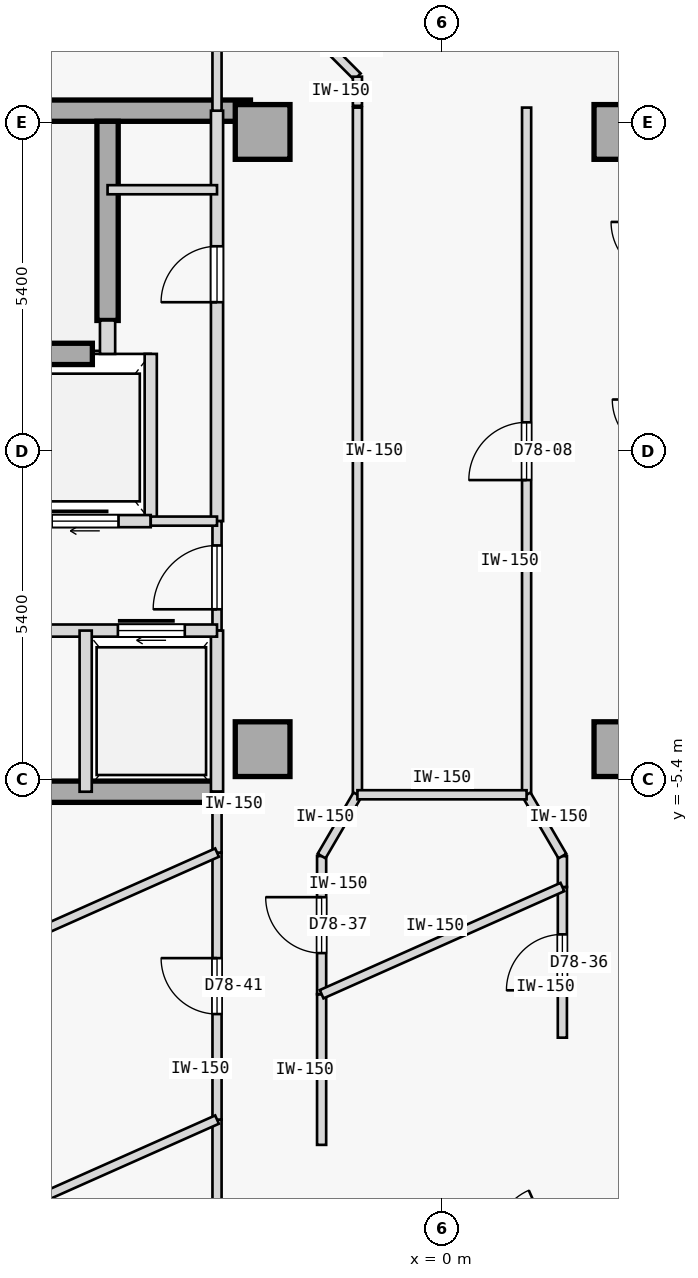
"""IFC4 building model, lengths in metres.
Left out: names, types, materials, properties, quantities, classifications, styles, units other than length and angle.
Written with IfcOpenShell. Run it as: python <this file> out.ifc"""

import sys

from ifc_helpers import new_model, si_unit, direction, frame, frame_2d, origin, origin_2d, place, context, subcontext, project, spatial, rectangle, extrude, element, fill, save


model = new_model("IFC4")
c1 = context("Model", 3, precision=1e-05, world=origin(), true_north=direction((0.0, 1.0)))
c2 = subcontext(c1, "Body", "Model", "MODEL_VIEW")
j1 = project(units=[si_unit("LENGTHUNIT", "METRE"), si_unit("PLANEANGLEUNIT", "RADIAN")], contexts=[c1])
p1 = place(None, origin())
s1 = spatial("IfcSite", under=j1, at=p1, CompositionType="ELEMENT")
p2 = place(p1, origin())
s2 = spatial("IfcBuilding", under=s1, at=p2, CompositionType="ELEMENT")
p3 = place(p2, frame((0.0, 0.0, 291.95)))
s3 = spatial("IfcBuildingStorey", under=s2, at=p3, CompositionType="ELEMENT", Elevation=291.95)
for number, where, z_axis, x_axis in (
    (1, (-2.95, -4.9, 0.0), (0.0, 0.0, 1.0), (1.0, 0.0, 0.0)),
    (2, (-2.95, 5.25, 0.0), (0.0, 0.0, 1.0), (1.0, 0.0, 0.0)),
    (3, (2.95, -4.9, 0.0), (0.0, 0.0, 1.0), (1.0, 0.0, 0.0)),
    (4, (2.95, 5.25, 0.0), (0.0, 0.0, 1.0), (1.0, 0.0, 0.0)),
):
    element("IfcColumn", number, at=place(p3, frame(where, z_axis=z_axis, x_axis=x_axis)), inside=s3, PredefinedType="COLUMN", context=c2, shape_type="SweptSolid", body=[
        extrude(rectangle(XDim=0.9, YDim=0.9, at=origin_2d()), origin(), (0.0, 0.0, 1.0), 3.35),
    ])
p4 = place(p3, frame((-14.56, 5.6, 0.0), z_axis=(0.0, 0.0, 1.0), x_axis=(1.0, 0.0, 0.0)))
e5 = element("IfcWall", 5, at=p4, inside=s3, PredefinedType="SHEAR", context=c2, shape_type="SweptSolid", body=[
    extrude(rectangle(XDim=11.41, YDim=0.35, at=frame_2d((5.705, 0.0))), origin(), (0.0, 0.0, 1.0), 3.125),
])
p5 = place(p3, frame((-14.56, -5.6, 0.0), z_axis=(0.0, 0.0, 1.0), x_axis=(1.0, 0.0, 0.0)))
e6 = element("IfcWall", 6, at=p5, inside=s3, PredefinedType="SHEAR", context=c2, shape_type="SweptSolid", body=[
    extrude(rectangle(XDim=10.86, YDim=0.35, at=frame_2d((5.43, 0.0))), origin(), (0.0, 0.0, 1.0), 3.125),
])
p6 = place(p3, frame((-5.5, 2.15, 0.0), z_axis=(0.0, 0.0, 1.0), x_axis=(0.0, 1.0, 0.0)))
e7 = element("IfcWall", 7, at=p6, inside=s3, PredefinedType="SHEAR", context=c2, shape_type="SweptSolid", body=[
    extrude(rectangle(XDim=3.275, YDim=0.35, at=frame_2d((1.638, 0.0))), origin(), (0.0, 0.0, 1.0), 3.125),
])
p7 = place(p3, frame((-10.9, 1.6, 0.0), z_axis=(0.0, 0.0, 1.0), x_axis=(1.0, 0.0, 0.0)))
e8 = element("IfcWall", 8, at=p7, inside=s3, PredefinedType="SHEAR", context=c2, shape_type="SweptSolid", body=[
    extrude(rectangle(XDim=5.15, YDim=0.35, at=frame_2d((2.575, 0.0))), origin(), (0.0, 0.0, 1.0), 3.125),
])
p8 = place(p3, frame((-5.5, 1.6, 0.0), z_axis=(0.0, 0.0, 1.0), x_axis=(0.0, 1.0, 0.0)))
e9 = element("IfcWall", 9, at=p8, inside=s3, PredefinedType="STANDARD", context=c2, shape_type="SweptSolid", body=[
    extrude(rectangle(XDim=0.55, YDim=0.25, at=frame_2d((0.275, 0.0))), origin(), (0.0, 0.0, 1.0), 3.125),
])
p9 = place(p3, frame((-3.7, -1.15, 0.0), z_axis=(0.0, 0.0, 1.0), x_axis=(0.0, 1.0, 0.0)))
e10 = element("IfcWall", 10, at=p9, inside=s3, PredefinedType="STANDARD", context=c2, shape_type="SweptSolid", body=[
    extrude(rectangle(XDim=6.75, YDim=0.2, at=frame_2d((3.375, 0.0))), origin(), (0.0, 0.0, 1.0), 3.125),
])
p10 = place(p9, frame((3.6, 0.0, 0.0)))
e11 = element("IfcOpeningElement", 11, at=p10, cuts=e10, PredefinedType="OPENING", context=c2, shape_type="SweptSolid", body=[
    extrude(rectangle(XDim=0.92, YDim=2.15, at=frame_2d((0.46, 1.075))), frame((0.0, 0.11, 0.0), z_axis=(0.0, -1.0, 0.0), x_axis=(1.0, 0.0, 0.0)), (0.0, 0.0, 1.0), 0.22),
])
p11 = place(p3, frame((-3.7, -2.95, 0.0), z_axis=(0.0, 0.0, 1.0), x_axis=(0.0, 1.0, 0.0)))
e12 = element("IfcWall", 12, at=p11, inside=s3, PredefinedType="PARTITIONING", context=c2, shape_type="SweptSolid", body=[
    extrude(rectangle(XDim=1.8, YDim=0.15, at=frame_2d((0.9, 0.0))), origin(), (0.0, 0.0, 1.0), 3.125),
])
p12 = place(p11, frame((0.35, 0.0, 0.0)))
e13 = element("IfcOpeningElement", 13, at=p12, cuts=e12, PredefinedType="OPENING", context=c2, shape_type="SweptSolid", body=[
    extrude(rectangle(XDim=1.05, YDim=2.18, at=frame_2d((0.525, 1.09))), frame((0.0, 0.085, 0.0), z_axis=(0.0, -1.0, 0.0), x_axis=(1.0, 0.0, 0.0)), (0.0, 0.0, 1.0), 0.17),
])
p13 = place(p3, frame((-3.7, -5.6, 0.0), z_axis=(0.0, 0.0, 1.0), x_axis=(0.0, 1.0, 0.0)))
e14 = element("IfcWall", 14, at=p13, inside=s3, PredefinedType="STANDARD", context=c2, shape_type="SweptSolid", body=[
    extrude(rectangle(XDim=2.65, YDim=0.2, at=frame_2d((1.325, 0.0))), origin(), (0.0, 0.0, 1.0), 3.125),
])
p14 = place(p3, frame((-4.79, -1.15, 0.0), z_axis=(0.0, 0.0, 1.0), x_axis=(0.0, 1.0, 0.0)))
e15 = element("IfcWall", 15, at=p14, inside=s3, PredefinedType="STANDARD", context=c2, shape_type="SweptSolid", body=[
    extrude(rectangle(XDim=2.75, YDim=0.2, at=frame_2d((1.375, 0.0))), origin(), (0.0, 0.0, 1.0), 3.125),
])
p15 = place(p3, frame((-6.95, -1.15, 0.0), z_axis=(0.0, 0.0, 1.0), x_axis=(1.0, 0.0, 0.0)))
e16 = element("IfcWall", 16, at=p15, inside=s3, PredefinedType="STANDARD", context=c2, shape_type="SweptSolid", body=[
    extrude(rectangle(XDim=2.16, YDim=0.2, at=frame_2d((1.08, 0.0))), origin(), (0.0, 0.0, 1.0), 3.125),
])
p16 = place(p15, frame((0.53, 0.0, 0.0)))
e17 = element("IfcOpeningElement", 17, at=p16, cuts=e16, PredefinedType="OPENING", context=c2, shape_type="SweptSolid", body=[
    extrude(rectangle(XDim=1.1, YDim=2.15, at=frame_2d((0.55, 1.075))), frame((0.0, 0.11, 0.0), z_axis=(0.0, -1.0, 0.0), x_axis=(1.0, 0.0, 0.0)), (0.0, 0.0, 1.0), 0.22),
])
p17 = place(p3, frame((-4.79, -1.15, 0.0), z_axis=(0.0, 0.0, 1.0), x_axis=(1.0, 0.0, 0.0)))
e18 = element("IfcWall", 18, at=p17, inside=s3, PredefinedType="PARTITIONING", context=c2, shape_type="SweptSolid", body=[
    extrude(rectangle(XDim=1.09, YDim=0.15, at=frame_2d((0.545, 0.0))), origin(), (0.0, 0.0, 1.0), 3.125),
])
p18 = place(p3, frame((-14.5, -2.95, 0.0), z_axis=(0.0, 0.0, 1.0), x_axis=(1.0, 0.0, 0.0)))
e19 = element("IfcWall", 19, at=p18, inside=s3, PredefinedType="STANDARD", context=c2, shape_type="SweptSolid", body=[
    extrude(rectangle(XDim=10.8, YDim=0.2, at=frame_2d((5.4, 0.0))), origin(), (0.0, 0.0, 1.0), 3.125),
])
p19 = place(p18, frame((9.17, 0.0, 0.0)))
e20 = element("IfcOpeningElement", 20, at=p19, cuts=e19, PredefinedType="OPENING", context=c2, shape_type="SweptSolid", body=[
    extrude(rectangle(XDim=1.1, YDim=2.15, at=frame_2d((0.55, 1.075))), frame((0.0, 0.11, 0.0), z_axis=(0.0, -1.0, 0.0), x_axis=(1.0, 0.0, 0.0)), (0.0, 0.0, 1.0), 0.22),
])
p20 = place(p18, frame((2.13, 0.0, 0.0)))
e21 = element("IfcOpeningElement", 21, at=p20, cuts=e19, PredefinedType="OPENING", context=c2, shape_type="SweptSolid", body=[
    extrude(rectangle(XDim=0.92, YDim=2.15, at=frame_2d((0.46, 1.075))), frame((0.0, 0.11, 0.0), z_axis=(0.0, -1.0, 0.0), x_axis=(1.0, 0.0, 0.0)), (0.0, 0.0, 1.0), 0.22),
])
p21 = place(p18, frame((6.45, 0.0, 0.0)))
e22 = element("IfcOpeningElement", 22, at=p21, cuts=e19, PredefinedType="OPENING", context=c2, shape_type="SweptSolid", body=[
    extrude(rectangle(XDim=0.92, YDim=2.15, at=frame_2d((0.46, 1.075))), frame((0.0, 0.11, 0.0), z_axis=(0.0, -1.0, 0.0), x_axis=(1.0, 0.0, 0.0)), (0.0, 0.0, 1.0), 0.22),
])
p22 = place(p3, frame((-5.86, -5.6, 0.0), z_axis=(0.0, 0.0, 1.0), x_axis=(0.0, 1.0, 0.0)))
e23 = element("IfcWall", 23, at=p22, inside=s3, PredefinedType="STANDARD", context=c2, shape_type="SweptSolid", body=[
    extrude(rectangle(XDim=2.65, YDim=0.2, at=frame_2d((1.325, 0.0))), origin(), (0.0, 0.0, 1.0), 3.125),
])
p23 = place(p3, frame((-5.5, 4.3, 0.0), z_axis=(0.0, 0.0, 1.0), x_axis=(1.0, 0.0, 0.0)))
e24 = element("IfcWall", 24, at=p23, inside=s3, PredefinedType="PARTITIONING", context=c2, shape_type="SweptSolid", body=[
    extrude(rectangle(XDim=1.8, YDim=0.15, at=frame_2d((0.9, 0.0))), origin(), (0.0, 0.0, 1.0), 3.125),
])
p24 = place(p3, frame((-1.391, -5.65, 0.0), z_axis=(0.0, 0.0, 1.0), x_axis=(-2.1605738e-05, 0.999999999767, 0.0)))
e25 = element("IfcWall", 25, at=p24, inside=s3, PredefinedType="PARTITIONING", context=c2, shape_type="SweptSolid", body=[
    extrude(rectangle(XDim=11.3, YDim=0.15, at=frame_2d((5.65, 0.0))), origin(), (0.0, 0.0, 1.0), 3.125),
])
p25 = place(p3, frame((1.391, -5.65, 0.0), z_axis=(0.0, 0.0, 1.0), x_axis=(4.3206809e-05, 0.999999999067, 0.0)))
e26 = element("IfcWall", 26, at=p25, inside=s3, PredefinedType="PARTITIONING", context=c2, shape_type="SweptSolid", body=[
    extrude(rectangle(XDim=11.301, YDim=0.15, at=frame_2d((5.65, 0.0))), origin(), (0.0, 0.0, 1.0), 3.125),
])
p26 = place(p25, frame((5.176, 0.0, 0.0)))
e27 = element("IfcOpeningElement", 27, at=p26, cuts=e26, PredefinedType="OPENING", context=c2, shape_type="SweptSolid", body=[
    extrude(rectangle(XDim=0.95, YDim=2.15, at=frame_2d((0.475, 1.075))), frame((0.0, 0.085, 0.0), z_axis=(0.0, -1.0, 0.0), x_axis=(1.0, 0.0, 0.0)), (0.0, 0.0, 1.0), 0.17),
])
p27 = place(p3, frame((-4.445, -15.808, 0.0), z_axis=(0.0, 0.0, 1.0), x_axis=(0.913546853922, 0.406733506966, 0.0)))
e28 = element("IfcWall", 28, at=p27, inside=s3, PredefinedType="PARTITIONING", context=c2, shape_type="SweptSolid", body=[
    extrude(rectangle(XDim=12.751, YDim=0.15, at=frame_2d((6.375, 0.0))), origin(), (0.0, 0.0, 1.0), 3.125),
])
p28 = place(p27, frame((5.9, 0.0, 0.0)))
e29 = element("IfcOpeningElement", 29, at=p28, cuts=e28, PredefinedType="OPENING", context=c2, shape_type="SweptSolid", body=[
    extrude(rectangle(XDim=0.95, YDim=2.15, at=frame_2d((0.475, 1.075))), frame((0.0, 0.085, 0.0), z_axis=(0.0, -1.0, 0.0), x_axis=(1.0, 0.0, 0.0)), (0.0, 0.0, 1.0), 0.17),
])
p29 = place(p3, frame((-1.98, -11.407, 0.0), z_axis=(0.0, 0.0, 1.0), x_axis=(9.8551295e-05, 0.999999995144, 0.0)))
e30 = element("IfcWall", 30, at=p29, inside=s3, PredefinedType="PARTITIONING", context=c2, shape_type="SweptSolid", body=[
    extrude(rectangle(XDim=2.477, YDim=0.15, at=frame_2d((1.239, 0.0))), origin(), (0.0, 0.0, 1.0), 3.125),
])
p30 = place(p3, frame((1.979, -9.645, 0.0), z_axis=(0.0, 0.0, 1.0), x_axis=(9.8541584e-05, 0.999999995145, 0.0)))
e31 = element("IfcWall", 31, at=p30, inside=s3, PredefinedType="PARTITIONING", context=c2, shape_type="SweptSolid", body=[
    extrude(rectangle(XDim=2.478, YDim=0.15, at=frame_2d((1.239, 0.0))), origin(), (0.0, 0.0, 1.0), 3.125),
])
p31 = place(p30, frame((0.779, 0.0, 0.0)))
e32 = element("IfcOpeningElement", 32, at=p31, cuts=e31, PredefinedType="OPENING", context=c2, shape_type="SweptSolid", body=[
    extrude(rectangle(XDim=0.92, YDim=2.15, at=frame_2d((0.46, 1.075))), frame((0.0, 0.085, 0.0), z_axis=(0.0, -1.0, 0.0), x_axis=(1.0, 0.0, 0.0)), (0.0, 0.0, 1.0), 0.17),
])
p32 = place(p3, frame((-1.98, -8.93, 0.0), z_axis=(0.0, 0.0, 1.0), x_axis=(-0.000107446008, 0.999999994228, 0.0)))
e33 = element("IfcWall", 33, at=p32, inside=s3, PredefinedType="PARTITIONING", context=c2, shape_type="SweptSolid", body=[
    extrude(rectangle(XDim=2.272, YDim=0.15, at=frame_2d((1.136, 0.0))), origin(), (0.0, 0.0, 1.0), 3.125),
])
p33 = place(p32, frame((0.676, 0.0, 0.0)))
e34 = element("IfcOpeningElement", 34, at=p33, cuts=e33, PredefinedType="OPENING", context=c2, shape_type="SweptSolid", body=[
    extrude(rectangle(XDim=0.92, YDim=2.15, at=frame_2d((0.46, 1.075))), frame((0.0, 0.085, 0.0), z_axis=(0.0, -1.0, 0.0), x_axis=(1.0, 0.0, 0.0)), (0.0, 0.0, 1.0), 0.17),
])
p34 = place(p3, frame((-1.98, -6.658, 0.0), z_axis=(0.0, 0.0, 1.0), x_axis=(0.504651025514, 0.863323428645, 0.0)))
e35 = element("IfcWall", 35, at=p34, inside=s3, PredefinedType="PARTITIONING", context=c2, shape_type="SweptSolid", body=[
    extrude(rectangle(XDim=1.167, YDim=0.15, at=frame_2d((0.584, 0.0))), origin(), (0.0, 0.0, 1.0), 3.125),
])
p35 = place(p3, frame((1.979, -7.167, 0.0), z_axis=(0.0, 0.0, 1.0), x_axis=(0.000961075962, 0.999999538166, 0.0)))
e36 = element("IfcWall", 36, at=p35, inside=s3, PredefinedType="PARTITIONING", context=c2, shape_type="SweptSolid", body=[
    extrude(rectangle(XDim=0.508, YDim=0.15, at=frame_2d((0.254, 0.0))), origin(), (0.0, 0.0, 1.0), 3.125),
])
p36 = place(p3, frame((1.391, -5.65, 0.0), z_axis=(0.0, 0.0, 1.0), x_axis=(0.504339173621, -0.863505644424, 0.0)))
e37 = element("IfcWall", 37, at=p36, inside=s3, PredefinedType="PARTITIONING", context=c2, shape_type="SweptSolid", body=[
    extrude(rectangle(XDim=1.167, YDim=0.15, at=frame_2d((0.583, 0.0))), origin(), (0.0, 0.0, 1.0), 3.125),
])
p37 = place(p3, frame((-3.7, -13.703, 0.0), z_axis=(0.0, 0.0, 1.0), x_axis=(9.0033312e-05, 0.999999995947, 0.0)))
e38 = element("IfcWall", 38, at=p37, inside=s3, PredefinedType="PARTITIONING", context=c2, shape_type="SweptSolid", body=[
    extrude(rectangle(XDim=2.712, YDim=0.15, at=frame_2d((1.356, 0.0))), origin(), (0.0, 0.0, 1.0), 3.125),
])
p38 = place(p3, frame((-3.7, -10.992, 0.0), z_axis=(0.0, 0.0, 1.0), x_axis=(0.0, 1.0, 0.0)))
e39 = element("IfcWall", 39, at=p38, inside=s3, PredefinedType="PARTITIONING", context=c2, shape_type="SweptSolid", body=[
    extrude(rectangle(XDim=4.391, YDim=0.15, at=frame_2d((2.195, 0.0))), origin(), (0.0, 0.0, 1.0), 3.125),
])
p39 = place(p38, frame((1.735, 0.0, 0.0)))
e40 = element("IfcOpeningElement", 40, at=p39, cuts=e39, PredefinedType="OPENING", context=c2, shape_type="SweptSolid", body=[
    extrude(rectangle(XDim=0.92, YDim=2.15, at=frame_2d((0.46, 1.075))), frame((0.0, 0.085, 0.0), z_axis=(0.0, -1.0, 0.0), x_axis=(1.0, 0.0, 0.0)), (0.0, 0.0, 1.0), 0.17),
])
p40 = place(p3, frame((-3.7, -6.601, 0.0), z_axis=(0.0, 0.0, 1.0), x_axis=(-0.000243783513, 0.999999970285, 0.0)))
e41 = element("IfcWall", 41, at=p40, inside=s3, PredefinedType="PARTITIONING", context=c2, shape_type="SweptSolid", body=[
    extrude(rectangle(XDim=1.001, YDim=0.15, at=frame_2d((0.501, 0.0))), origin(), (0.0, 0.0, 1.0), 3.125),
])
p41 = place(p3, frame((-1.98, 6.749, 0.0), z_axis=(0.0, 0.0, 1.0), x_axis=(0.706520457458, -0.707692619146, 0.0)))
e42 = element("IfcWall", 42, at=p41, inside=s3, PredefinedType="PARTITIONING", context=c2, shape_type="SweptSolid", body=[
    extrude(rectangle(XDim=0.833, YDim=0.15, at=frame_2d((0.417, 0.0))), origin(), (0.0, 0.0, 1.0), 3.125),
])
p42 = place(p3, frame((-1.391, 5.68, 0.0), z_axis=(0.0, 0.0, 1.0), x_axis=(0.0, 1.0, 0.0)))
e43 = element("IfcWall", 43, at=p42, inside=s3, PredefinedType="PARTITIONING", context=c2, shape_type="SweptSolid", body=[
    extrude(rectangle(XDim=0.479, YDim=0.15, at=frame_2d((0.24, 0.0))), origin(), (0.0, 0.0, 1.0), 3.125),
])
p43 = place(p3, frame((-3.7, 5.6, 0.0), z_axis=(0.0, 0.0, 1.0), x_axis=(5.077173e-05, 0.999999998711, 0.0)))
e44 = element("IfcWall", 44, at=p43, inside=s3, PredefinedType="PARTITIONING", context=c2, shape_type="SweptSolid", body=[
    extrude(rectangle(XDim=4.809, YDim=0.15, at=frame_2d((2.404, 0.0))), origin(), (0.0, 0.0, 1.0), 3.125),
])
p44 = place(p3, frame((-1.391, -5.65, 0.0), z_axis=(0.0, 0.0, 1.0), x_axis=(0.999999984594, -0.000175530979, 0.0)))
e45 = element("IfcWall", 45, at=p44, inside=s3, PredefinedType="PARTITIONING", context=c2, shape_type="SweptSolid", body=[
    extrude(rectangle(XDim=2.782, YDim=0.15, at=frame_2d((1.391, 0.0))), origin(), (0.0, 0.0, 1.0), 3.125),
])
p45 = place(p3, frame((-1.98, -8.93, 0.0), z_axis=(0.0, 0.0, 1.0), x_axis=(0.913530252303, 0.406770793111, 0.0)))
e46 = element("IfcWall", 46, at=p45, inside=s3, PredefinedType="PARTITIONING", context=c2, shape_type="SweptSolid", body=[
    extrude(rectangle(XDim=4.334, YDim=0.15, at=frame_2d((2.167, 0.0))), origin(), (0.0, 0.0, 1.0), 3.125),
])
p46 = place(p3, frame((-10.709, -14.113, 0.0), z_axis=(0.0, 0.0, 1.0), x_axis=(0.91353843513, 0.40675241553, 0.0)))
e47 = element("IfcWall", 47, at=p46, inside=s3, PredefinedType="PARTITIONING", context=c2, shape_type="SweptSolid", body=[
    extrude(rectangle(XDim=7.673, YDim=0.15, at=frame_2d((3.836, 0.0))), origin(), (0.0, 0.0, 1.0), 3.125),
])
p47 = place(p3, frame((-12.341, -10.448, 0.0), z_axis=(0.0, 0.0, 1.0), x_axis=(0.913539934271, 0.406749048544, 0.0)))
e48 = element("IfcWall", 48, at=p47, inside=s3, PredefinedType="PARTITIONING", context=c2, shape_type="SweptSolid", body=[
    extrude(rectangle(XDim=9.459, YDim=0.15, at=frame_2d((4.729, 0.0))), origin(), (0.0, 0.0, 1.0), 3.125),
])
p48 = place(p47, frame((4.27, 0.0, 0.0)))
e49 = element("IfcOpeningElement", 49, at=p48, cuts=e48, PredefinedType="OPENING", context=c2, shape_type="SweptSolid", body=[
    extrude(rectangle(XDim=0.92, YDim=2.15, at=frame_2d((0.46, 1.075))), frame((0.0, 0.085, 0.0), z_axis=(0.0, -1.0, 0.0), x_axis=(1.0, 0.0, 0.0)), (0.0, 0.0, 1.0), 0.17),
])
p49 = place(p12, origin())
e50 = element("IfcDoor", 50, at=p49, inside=s3, OperationType="SINGLE_SWING_LEFT", PredefinedType="DOOR", context=c2, shape_type="SweptSolid", body=[
    extrude(rectangle(XDim=1.05, YDim=2.18, at=frame_2d((0.525, 1.09))), frame((0.0, 0.025, 0.0), z_axis=(0.0, -1.0, 0.0), x_axis=(1.0, 0.0, 0.0)), (0.0, 0.0, 1.0), 0.05),
])
fill(e13, e50)
p50 = place(p16, origin())
e51 = element("IfcDoor", 51, at=p50, inside=s3, OperationType="SLIDING_TO_RIGHT", PredefinedType="DOOR", context=c2, shape_type="SweptSolid", body=[
    extrude(rectangle(XDim=1.1, YDim=2.15, at=frame_2d((0.55, 1.075))), frame((0.0, 0.025, 0.0), z_axis=(0.0, -1.0, 0.0), x_axis=(1.0, 0.0, 0.0)), (0.0, 0.0, 1.0), 0.05),
])
fill(e17, e51)
p51 = place(p19, origin())
e52 = element("IfcDoor", 52, at=p51, inside=s3, OperationType="SLIDING_TO_RIGHT", PredefinedType="DOOR", context=c2, shape_type="SweptSolid", body=[
    extrude(rectangle(XDim=1.1, YDim=2.15, at=frame_2d((0.55, 1.075))), frame((0.0, 0.025, 0.0), z_axis=(0.0, -1.0, 0.0), x_axis=(1.0, 0.0, 0.0)), (0.0, 0.0, 1.0), 0.05),
])
fill(e20, e52)
p52 = place(p10, origin())
e53 = element("IfcDoor", 53, at=p52, inside=s3, OperationType="SINGLE_SWING_LEFT", PredefinedType="DOOR", context=c2, shape_type="SweptSolid", body=[
    extrude(rectangle(XDim=0.92, YDim=2.15, at=frame_2d((0.46, 1.075))), frame((0.0, 0.025, 0.0), z_axis=(0.0, -1.0, 0.0), x_axis=(1.0, 0.0, 0.0)), (0.0, 0.0, 1.0), 0.05),
])
fill(e11, e53)
p53 = place(p26, origin())
e54 = element("IfcDoor", 54, at=p53, inside=s3, OperationType="SINGLE_SWING_LEFT", PredefinedType="DOOR", context=c2, shape_type="SweptSolid", body=[
    extrude(rectangle(XDim=0.95, YDim=2.15, at=frame_2d((0.475, 1.075))), frame((0.0, 0.025, 0.0), z_axis=(0.0, -1.0, 0.0), x_axis=(1.0, 0.0, 0.0)), (0.0, 0.0, 1.0), 0.05),
])
fill(e27, e54)
p54 = place(p31, origin())
e55 = element("IfcDoor", 55, at=p54, inside=s3, OperationType="SINGLE_SWING_LEFT", PredefinedType="DOOR", context=c2, shape_type="SweptSolid", body=[
    extrude(rectangle(XDim=0.92, YDim=2.15, at=frame_2d((0.46, 1.075))), frame((0.0, 0.025, 0.0), z_axis=(0.0, -1.0, 0.0), x_axis=(1.0, 0.0, 0.0)), (0.0, 0.0, 1.0), 0.05),
])
fill(e32, e55)
p55 = place(p33, origin())
e56 = element("IfcDoor", 56, at=p55, inside=s3, OperationType="SINGLE_SWING_RIGHT", PredefinedType="DOOR", context=c2, shape_type="SweptSolid", body=[
    extrude(rectangle(XDim=0.92, YDim=2.15, at=frame_2d((0.46, 1.075))), frame((0.0, 0.025, 0.0), z_axis=(0.0, -1.0, 0.0), x_axis=(1.0, 0.0, 0.0)), (0.0, 0.0, 1.0), 0.05),
])
fill(e34, e56)
p56 = place(p39, origin())
e57 = element("IfcDoor", 57, at=p56, inside=s3, OperationType="SINGLE_SWING_RIGHT", PredefinedType="DOOR", context=c2, shape_type="SweptSolid", body=[
    extrude(rectangle(XDim=0.92, YDim=2.15, at=frame_2d((0.46, 1.075))), frame((0.0, 0.025, 0.0), z_axis=(0.0, -1.0, 0.0), x_axis=(1.0, 0.0, 0.0)), (0.0, 0.0, 1.0), 0.05),
])
fill(e40, e57)
save(model, sys.argv[1])
